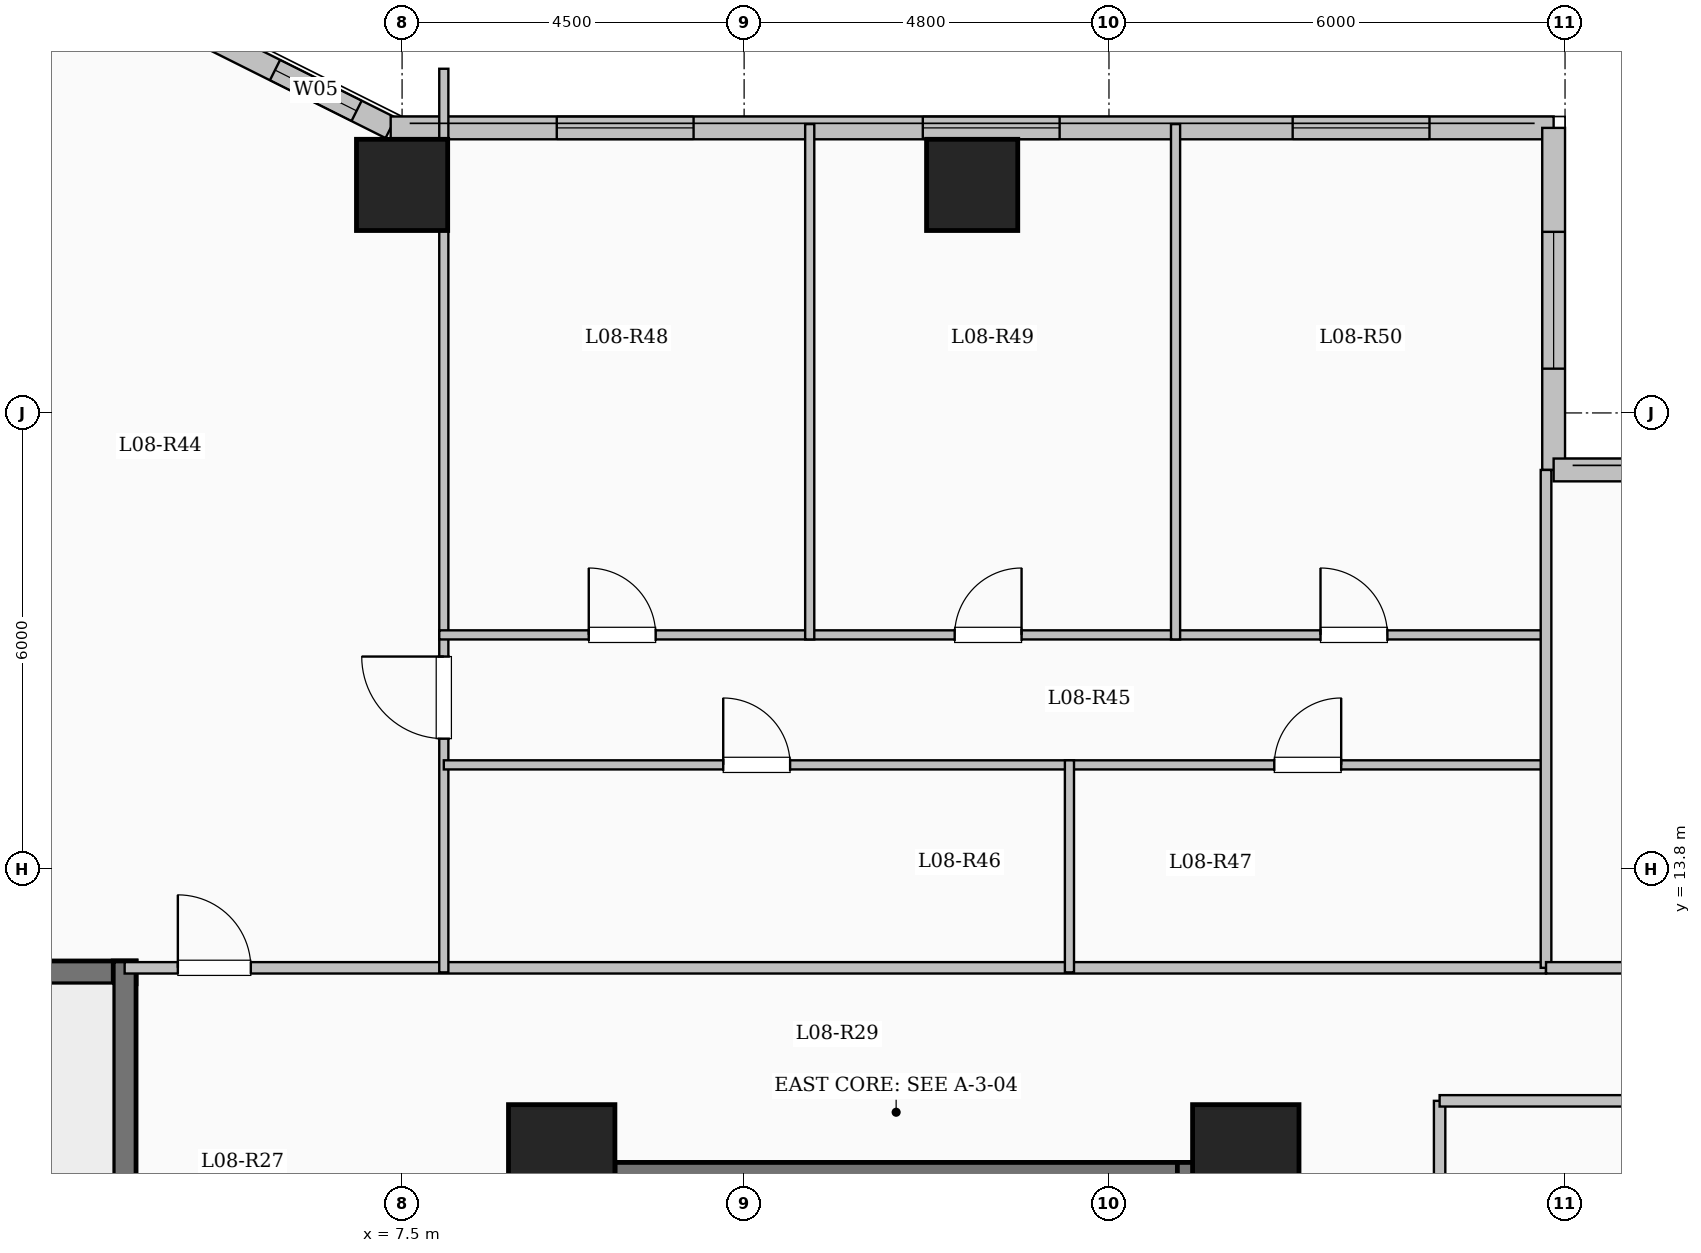
"""IFC4 building model, lengths in metres.
Left out: names, types, materials, properties, quantities, classifications, styles, units other than length and angle.
Written with IfcOpenShell. Run it as: python <this file> out.ifc"""

import sys

from ifc_helpers import new_model, si_unit, direction, frame, frame_2d, origin, origin_2d, place, context, subcontext, project, spatial, rectangle, extrude, element, fill, save


model = new_model("IFC4")
c1 = context("Model", 3, precision=1e-05, world=origin(), true_north=direction((0.0, 1.0)))
c2 = subcontext(c1, "Body", "Model", "MODEL_VIEW")
j1 = project(units=[si_unit("LENGTHUNIT", "METRE"), si_unit("PLANEANGLEUNIT", "RADIAN")], contexts=[c1])
p1 = place(None, origin())
s1 = spatial("IfcSite", under=j1, at=p1, CompositionType="ELEMENT")
p2 = place(p1, origin())
s2 = spatial("IfcBuilding", under=s1, at=p2, CompositionType="ELEMENT")
p3 = place(p2, frame((0.0, 0.0, 34.05)))
s3 = spatial("IfcBuildingStorey", under=s2, at=p3, CompositionType="ELEMENT", Elevation=34.05)
for number, where, z_axis, x_axis in (
    (1, (9.6, 10.0, 0.0), (0.0, 0.0, 1.0), (1.0, 0.0, 0.0)),
    (2, (18.6, 10.0, 0.0), (0.0, 0.0, 1.0), (1.0, 0.0, 0.0)),
):
    element("IfcColumn", number, at=place(p3, frame(where, z_axis=z_axis, x_axis=x_axis)), inside=s3, PredefinedType="COLUMN", context=c2, shape_type="SweptSolid", body=[
        extrude(rectangle(XDim=1.4, YDim=1.4, at=origin_2d()), origin(), (0.0, 0.0, 1.0), 3.35),
    ])
for number, where, z_axis, x_axis in (
    (3, (7.5, 22.8, 0.0), (0.0, 0.0, 1.0), (1.0, 0.0, 0.0)),
    (4, (15.0, 22.8, 0.0), (0.0, 0.0, 1.0), (1.0, 0.0, 0.0)),
):
    element("IfcColumn", number, at=place(p3, frame(where, z_axis=z_axis, x_axis=x_axis)), inside=s3, PredefinedType="COLUMN", context=c2, shape_type="SweptSolid", body=[
        extrude(rectangle(XDim=1.2, YDim=1.2, at=origin_2d()), origin(), (0.0, 0.0, 1.0), 3.35),
    ])
p4 = place(p3, frame((4.35, 25.05, 0.0), z_axis=(0.0, 0.0, 1.0), x_axis=(0.894427191, -0.4472135955, 0.0)))
e5 = element("IfcWall", 5, at=p4, inside=s3, PredefinedType="SOLIDWALL", context=c2, shape_type="SweptSolid", body=[
    extrude(rectangle(XDim=3.354, YDim=0.3, at=frame_2d((1.677, 0.0))), origin(), (0.0, 0.0, 1.0), 3.1),
])
p5 = place(p4, frame((1.653, 0.0, 0.95)))
e6 = element("IfcOpeningElement", 6, at=p5, cuts=e5, PredefinedType="OPENING", context=c2, shape_type="SweptSolid", body=[
    extrude(rectangle(XDim=1.2, YDim=1.5, at=frame_2d((0.6, 0.75))), frame((0.0, 0.16, 0.0), z_axis=(0.0, -1.0, 0.0), x_axis=(1.0, 0.0, 0.0)), (0.0, 0.0, 1.0), 0.32),
])
p6 = place(p3, frame((7.35, 23.55, 0.0), z_axis=(0.0, 0.0, 1.0), x_axis=(1.0, 0.0, 0.0)))
e7 = element("IfcWall", 7, at=p6, inside=s3, PredefinedType="SOLIDWALL", context=c2, shape_type="SweptSolid", body=[
    extrude(rectangle(XDim=15.3, YDim=0.3, at=frame_2d((7.65, 0.0))), origin(), (0.0, 0.0, 1.0), 3.1),
])
p7 = place(p6, frame((2.185, 0.0, 0.9)))
e8 = element("IfcOpeningElement", 8, at=p7, cuts=e7, PredefinedType="OPENING", context=c2, shape_type="SweptSolid", body=[
    extrude(rectangle(XDim=1.8, YDim=1.65, at=frame_2d((0.9, 0.825))), frame((0.0, 0.16, 0.0), z_axis=(0.0, -1.0, 0.0), x_axis=(1.0, 0.0, 0.0)), (0.0, 0.0, 1.0), 0.32),
])
p8 = place(p6, frame((7.001, 0.0, 0.9)))
e9 = element("IfcOpeningElement", 9, at=p8, cuts=e7, PredefinedType="OPENING", context=c2, shape_type="SweptSolid", body=[
    extrude(rectangle(XDim=1.8, YDim=1.65, at=frame_2d((0.9, 0.825))), frame((0.0, 0.16, 0.0), z_axis=(0.0, -1.0, 0.0), x_axis=(1.0, 0.0, 0.0)), (0.0, 0.0, 1.0), 0.32),
])
p9 = place(p6, frame((11.867, 0.0, 0.9)))
e10 = element("IfcOpeningElement", 10, at=p9, cuts=e7, PredefinedType="OPENING", context=c2, shape_type="SweptSolid", body=[
    extrude(rectangle(XDim=1.8, YDim=1.65, at=frame_2d((0.9, 0.825))), frame((0.0, 0.16, 0.0), z_axis=(0.0, -1.0, 0.0), x_axis=(1.0, 0.0, 0.0)), (0.0, 0.0, 1.0), 0.32),
])
p10 = place(p3, frame((22.65, 23.55, 0.0), z_axis=(0.0, 0.0, 1.0), x_axis=(0.0, -1.0, 0.0)))
e11 = element("IfcWall", 11, at=p10, inside=s3, PredefinedType="SOLIDWALL", context=c2, shape_type="SweptSolid", body=[
    extrude(rectangle(XDim=4.5, YDim=0.3, at=frame_2d((2.25, 0.0))), origin(), (0.0, 0.0, 1.0), 3.1),
])
p11 = place(p10, frame((1.367, 0.0, 0.9)))
e12 = element("IfcOpeningElement", 12, at=p11, cuts=e11, PredefinedType="OPENING", context=c2, shape_type="SweptSolid", body=[
    extrude(rectangle(XDim=1.8, YDim=1.65, at=frame_2d((0.9, 0.825))), frame((0.0, 0.16, 0.0), z_axis=(0.0, -1.0, 0.0), x_axis=(1.0, 0.0, 0.0)), (0.0, 0.0, 1.0), 0.32),
])
p12 = place(p3, frame((22.65, 19.05, 0.0), z_axis=(0.0, 0.0, 1.0), x_axis=(1.0, 0.0, 0.0)))
e13 = element("IfcWall", 13, at=p12, inside=s3, PredefinedType="SOLIDWALL", context=c2, shape_type="SweptSolid", body=[
    extrude(rectangle(XDim=6.0, YDim=0.3, at=frame_2d((3.0, 0.0))), origin(), (0.0, 0.0, 1.0), 3.1),
])
p13 = place(p12, frame((1.975, 0.0, 0.9)))
e14 = element("IfcOpeningElement", 14, at=p13, cuts=e13, PredefinedType="OPENING", context=c2, shape_type="SweptSolid", body=[
    extrude(rectangle(XDim=2.0, YDim=1.7, at=frame_2d((1.0, 0.85))), frame((0.0, 0.16, 0.0), z_axis=(0.0, -1.0, 0.0), x_axis=(1.0, 0.0, 0.0)), (0.0, 0.0, 1.0), 0.32),
])
p14 = place(p3, frame((10.0, 9.79, 0.0), z_axis=(0.0, 0.0, 1.0), x_axis=(1.0, 0.0, 0.0)))
e15 = element("IfcWall", 15, at=p14, inside=s3, PredefinedType="SHEAR", context=c2, shape_type="SweptSolid", body=[
    extrude(rectangle(XDim=8.0, YDim=0.3, at=frame_2d((4.0, 0.0))), origin(), (0.0, 0.0, 1.0), 3.35),
])
for number, where, z_axis, x_axis in (
    (16, (10.15, 6.35, 0.0), (0.0, 0.0, 1.0), (0.0, 1.0, 0.0)),
    (17, (17.85, 6.35, 0.0), (0.0, 0.0, 1.0), (0.0, 1.0, 0.0)),
):
    element("IfcWall", number, at=place(p3, frame(where, z_axis=z_axis, x_axis=x_axis)), inside=s3, PredefinedType="SHEAR", context=c2, shape_type="SweptSolid", body=[
        extrude(rectangle(XDim=3.59, YDim=0.3, at=frame_2d((1.795, 0.0))), origin(), (0.0, 0.0, 1.0), 3.35),
    ])
p15 = place(p3, frame((-4.0, 12.44, 0.0), z_axis=(0.0, 0.0, 1.0), x_axis=(1.0, 0.0, 0.0)))
e18 = element("IfcWall", 18, at=p15, inside=s3, PredefinedType="SHEAR", context=c2, shape_type="SweptSolid", body=[
    extrude(rectangle(XDim=8.0, YDim=0.3, at=frame_2d((4.0, 0.0))), origin(), (0.0, 0.0, 1.0), 3.35),
])
p16 = place(p3, frame((3.85, 9.0, 0.0), z_axis=(0.0, 0.0, 1.0), x_axis=(0.0, 1.0, 0.0)))
e19 = element("IfcWall", 19, at=p16, inside=s3, PredefinedType="SHEAR", context=c2, shape_type="SweptSolid", body=[
    extrude(rectangle(XDim=3.59, YDim=0.3, at=frame_2d((1.795, 0.0))), origin(), (0.0, 0.0, 1.0), 3.35),
])
p17 = place(p3, frame((3.85, 12.5, 0.0), z_axis=(0.0, 0.0, 1.0), x_axis=(1.0, 0.0, 0.0)))
e20 = element("IfcWall", 20, at=p17, inside=s3, PredefinedType="PARTITIONING", context=c2, shape_type="SweptSolid", body=[
    extrude(rectangle(XDim=18.7, YDim=0.15, at=frame_2d((9.35, 0.0))), origin(), (0.0, 0.0, 1.0), 3.1),
])
p18 = place(p17, frame((0.7, 0.0, 0.0)))
e21 = element("IfcOpeningElement", 21, at=p18, cuts=e20, PredefinedType="OPENING", context=c2, shape_type="SweptSolid", body=[
    extrude(rectangle(XDim=0.96, YDim=2.15, at=frame_2d((0.48, 1.075))), frame((0.0, 0.085, 0.0), z_axis=(0.0, -1.0, 0.0), x_axis=(1.0, 0.0, 0.0)), (0.0, 0.0, 1.0), 0.17),
])
p19 = place(p3, frame((21.15, -7.25, 0.0), z_axis=(0.0, 0.0, 1.0), x_axis=(0.0, 1.0, 0.0)))
e22 = element("IfcWall", 22, at=p19, inside=s3, PredefinedType="PARTITIONING", context=c2, shape_type="SweptSolid", body=[
    extrude(rectangle(XDim=18.0, YDim=0.15, at=frame_2d((9.0, 0.0))), origin(), (0.0, 0.0, 1.0), 2.585),
])
p20 = place(p3, frame((8.049, 12.44, 0.0), z_axis=(0.0, 0.0, 1.0), x_axis=(0.0, 1.0, 0.0)))
e23 = element("IfcWall", 23, at=p20, inside=s3, PredefinedType="PARTITIONING", context=c2, shape_type="SweptSolid", body=[
    extrude(rectangle(XDim=11.888, YDim=0.12, at=frame_2d((5.944, 0.0))), origin(), (0.0, 0.0, 1.0), 2.435),
])
p21 = place(p20, frame((3.075, 0.0, 0.0)))
e24 = element("IfcOpeningElement", 24, at=p21, cuts=e23, PredefinedType="OPENING", context=c2, shape_type="SweptSolid", body=[
    extrude(rectangle(XDim=1.08, YDim=2.15, at=frame_2d((0.54, 1.075))), frame((0.0, 0.07, 0.0), z_axis=(0.0, -1.0, 0.0), x_axis=(1.0, 0.0, 0.0)), (0.0, 0.0, 1.0), 0.14),
])
p22 = place(p3, frame((8.049, 15.17, 0.0), z_axis=(0.0, 0.0, 1.0), x_axis=(1.0, 0.0, 0.0)))
e25 = element("IfcWall", 25, at=p22, inside=s3, PredefinedType="PARTITIONING", context=c2, shape_type="SweptSolid", body=[
    extrude(rectangle(XDim=8.231, YDim=0.12, at=frame_2d((4.115, 0.0))), origin(), (0.0, 0.0, 1.0), 3.1),
])
p23 = place(p22, frame((3.676, 0.0, 0.0)))
e26 = element("IfcOpeningElement", 26, at=p23, cuts=e25, PredefinedType="OPENING", context=c2, shape_type="SweptSolid", body=[
    extrude(rectangle(XDim=0.88, YDim=2.1, at=frame_2d((0.44, 1.05))), frame((0.0, 0.07, 0.0), z_axis=(0.0, -1.0, 0.0), x_axis=(1.0, 0.0, 0.0)), (0.0, 0.0, 1.0), 0.14),
])
p24 = place(p3, frame((16.28, 15.17, 0.0), z_axis=(0.0, 0.0, 1.0), x_axis=(1.0, 0.0, 0.0)))
e27 = element("IfcWall", 27, at=p24, inside=s3, PredefinedType="PARTITIONING", context=c2, shape_type="SweptSolid", body=[
    extrude(rectangle(XDim=6.27, YDim=0.12, at=frame_2d((3.135, 0.0))), origin(), (0.0, 0.0, 1.0), 3.1),
])
p25 = place(p24, frame((2.695, 0.0, 0.0)))
e28 = element("IfcOpeningElement", 28, at=p25, cuts=e27, PredefinedType="OPENING", context=c2, shape_type="SweptSolid", body=[
    extrude(rectangle(XDim=0.88, YDim=2.1, at=frame_2d((0.44, 1.05))), frame((0.0, 0.07, 0.0), z_axis=(0.0, -1.0, 0.0), x_axis=(1.0, 0.0, 0.0)), (0.0, 0.0, 1.0), 0.14),
])
p26 = place(p3, frame((7.989, 16.88, 0.0), z_axis=(0.0, 0.0, 1.0), x_axis=(1.0, 0.0, 0.0)))
e29 = element("IfcWall", 29, at=p26, inside=s3, PredefinedType="PARTITIONING", context=c2, shape_type="SweptSolid", body=[
    extrude(rectangle(XDim=14.621, YDim=0.12, at=frame_2d((7.311, 0.0))), origin(), (0.0, 0.0, 1.0), 3.1),
])
p27 = place(p26, frame((1.967, 0.0, 0.0)))
e30 = element("IfcOpeningElement", 30, at=p27, cuts=e29, PredefinedType="OPENING", context=c2, shape_type="SweptSolid", body=[
    extrude(rectangle(XDim=0.88, YDim=2.1, at=frame_2d((0.44, 1.05))), frame((0.0, 0.07, 0.0), z_axis=(0.0, -1.0, 0.0), x_axis=(1.0, 0.0, 0.0)), (0.0, 0.0, 1.0), 0.14),
])
p28 = place(p26, frame((6.781, 0.0, 0.0)))
e31 = element("IfcOpeningElement", 31, at=p28, cuts=e29, PredefinedType="OPENING", context=c2, shape_type="SweptSolid", body=[
    extrude(rectangle(XDim=0.88, YDim=2.1, at=frame_2d((0.44, 1.05))), frame((0.0, 0.07, 0.0), z_axis=(0.0, -1.0, 0.0), x_axis=(1.0, 0.0, 0.0)), (0.0, 0.0, 1.0), 0.14),
])
p29 = place(p26, frame((11.594, 0.0, 0.0)))
e32 = element("IfcOpeningElement", 32, at=p29, cuts=e29, PredefinedType="OPENING", context=c2, shape_type="SweptSolid", body=[
    extrude(rectangle(XDim=0.88, YDim=2.1, at=frame_2d((0.44, 1.05))), frame((0.0, 0.07, 0.0), z_axis=(0.0, -1.0, 0.0), x_axis=(1.0, 0.0, 0.0)), (0.0, 0.0, 1.0), 0.14),
])
p30 = place(p3, frame((16.28, 12.44, 0.0), z_axis=(0.0, 0.0, 1.0), x_axis=(0.0, 1.0, 0.0)))
e33 = element("IfcWall", 33, at=p30, inside=s3, PredefinedType="PARTITIONING", context=c2, shape_type="SweptSolid", body=[
    extrude(rectangle(XDim=2.79, YDim=0.12, at=frame_2d((1.395, 0.0))), origin(), (0.0, 0.0, 1.0), 3.1),
])
for number, where, z_axis, x_axis in (
    (34, (12.863, 16.82, 0.0), (0.0, 0.0, 1.0), (0.0, 1.0, 0.0)),
    (35, (17.676, 16.82, 0.0), (0.0, 0.0, 1.0), (0.0, 1.0, 0.0)),
):
    element("IfcWall", number, at=place(p3, frame(where, z_axis=z_axis, x_axis=x_axis)), inside=s3, PredefinedType="PARTITIONING", context=c2, shape_type="SweptSolid", body=[
        extrude(rectangle(XDim=6.78, YDim=0.12, at=frame_2d((3.39, 0.0))), origin(), (0.0, 0.0, 1.0), 3.1),
    ])
p31 = place(p3, frame((21.15, 10.75, 0.0), z_axis=(0.0, 0.0, 1.0), x_axis=(1.0, 0.0, 0.0)))
e36 = element("IfcWall", 36, at=p31, inside=s3, PredefinedType="PARTITIONING", context=c2, shape_type="SweptSolid", body=[
    extrude(rectangle(XDim=7.53, YDim=0.15, at=frame_2d((3.765, 0.0))), origin(), (0.0, 0.0, 1.0), 3.1),
])
p32 = place(p3, frame((22.55, 12.5, 0.0), z_axis=(0.0, 0.0, 1.0), x_axis=(0.0, 1.0, 0.0)))
e37 = element("IfcWall", 37, at=p32, inside=s3, PredefinedType="PARTITIONING", context=c2, shape_type="SweptSolid", body=[
    extrude(rectangle(XDim=6.55, YDim=0.14, at=frame_2d((3.275, 0.0))), origin(), (0.0, 0.0, 1.0), 3.1),
])
p33 = place(p3, frame((22.55, 12.5, 0.0), z_axis=(0.0, 0.0, 1.0), x_axis=(1.0, 0.0, 0.0)))
e38 = element("IfcWall", 38, at=p33, inside=s3, PredefinedType="PARTITIONING", context=c2, shape_type="SweptSolid", body=[
    extrude(rectangle(XDim=6.13, YDim=0.15, at=frame_2d((3.065, 0.0))), origin(), (0.0, 0.0, 1.0), 3.1),
])
p34 = place(p33, frame((2.59, 0.0, 0.0)))
e39 = element("IfcOpeningElement", 39, at=p34, cuts=e38, PredefinedType="OPENING", context=c2, shape_type="SweptSolid", body=[
    extrude(rectangle(XDim=0.95, YDim=2.15, at=frame_2d((0.475, 1.075))), frame((0.0, 0.085, 0.0), z_axis=(0.0, -1.0, 0.0), x_axis=(1.0, 0.0, 0.0)), (0.0, 0.0, 1.0), 0.17),
])
p35 = place(p5, origin())
e40 = element("IfcWindow", 40, at=p35, inside=s3, PartitioningType="SINGLE_PANEL", PredefinedType="WINDOW", context=c2, shape_type="SweptSolid", body=[
    extrude(rectangle(XDim=1.2, YDim=1.5, at=frame_2d((0.6, 0.75))), frame((0.0, 0.03, 0.0), z_axis=(0.0, -1.0, 0.0), x_axis=(1.0, 0.0, 0.0)), (0.0, 0.0, 1.0), 0.06),
])
fill(e6, e40)
p36 = place(p7, origin())
e41 = element("IfcWindow", 41, at=p36, inside=s3, PartitioningType="SINGLE_PANEL", PredefinedType="WINDOW", context=c2, shape_type="SweptSolid", body=[
    extrude(rectangle(XDim=1.8, YDim=1.65, at=frame_2d((0.9, 0.825))), frame((0.0, 0.03, 0.0), z_axis=(0.0, -1.0, 0.0), x_axis=(1.0, 0.0, 0.0)), (0.0, 0.0, 1.0), 0.06),
])
fill(e8, e41)
p37 = place(p8, origin())
e42 = element("IfcWindow", 42, at=p37, inside=s3, PartitioningType="SINGLE_PANEL", PredefinedType="WINDOW", context=c2, shape_type="SweptSolid", body=[
    extrude(rectangle(XDim=1.8, YDim=1.65, at=frame_2d((0.9, 0.825))), frame((0.0, 0.03, 0.0), z_axis=(0.0, -1.0, 0.0), x_axis=(1.0, 0.0, 0.0)), (0.0, 0.0, 1.0), 0.06),
])
fill(e9, e42)
p38 = place(p9, origin())
e43 = element("IfcWindow", 43, at=p38, inside=s3, PartitioningType="SINGLE_PANEL", PredefinedType="WINDOW", context=c2, shape_type="SweptSolid", body=[
    extrude(rectangle(XDim=1.8, YDim=1.65, at=frame_2d((0.9, 0.825))), frame((0.0, 0.03, 0.0), z_axis=(0.0, -1.0, 0.0), x_axis=(1.0, 0.0, 0.0)), (0.0, 0.0, 1.0), 0.06),
])
fill(e10, e43)
p39 = place(p11, origin())
e44 = element("IfcWindow", 44, at=p39, inside=s3, PartitioningType="SINGLE_PANEL", PredefinedType="WINDOW", context=c2, shape_type="SweptSolid", body=[
    extrude(rectangle(XDim=1.8, YDim=1.65, at=frame_2d((0.9, 0.825))), frame((0.0, 0.03, 0.0), z_axis=(0.0, -1.0, 0.0), x_axis=(1.0, 0.0, 0.0)), (0.0, 0.0, 1.0), 0.06),
])
fill(e12, e44)
p40 = place(p18, origin())
e45 = element("IfcDoor", 45, at=p40, inside=s3, OperationType="SINGLE_SWING_LEFT", PredefinedType="DOOR", context=c2, shape_type="SweptSolid", body=[
    extrude(rectangle(XDim=0.96, YDim=2.15, at=frame_2d((0.48, 1.075))), frame((0.0, 0.025, 0.0), z_axis=(0.0, -1.0, 0.0), x_axis=(1.0, 0.0, 0.0)), (0.0, 0.0, 1.0), 0.05),
])
fill(e21, e45)
p41 = place(p21, origin())
e46 = element("IfcDoor", 46, at=p41, inside=s3, OperationType="SINGLE_SWING_RIGHT", PredefinedType="DOOR", context=c2, shape_type="SweptSolid", body=[
    extrude(rectangle(XDim=1.08, YDim=2.15, at=frame_2d((0.54, 1.075))), frame((0.0, 0.025, 0.0), z_axis=(0.0, -1.0, 0.0), x_axis=(1.0, 0.0, 0.0)), (0.0, 0.0, 1.0), 0.05),
])
fill(e24, e46)
p42 = place(p23, origin())
e47 = element("IfcDoor", 47, at=p42, inside=s3, OperationType="SINGLE_SWING_LEFT", PredefinedType="DOOR", context=c2, shape_type="SweptSolid", body=[
    extrude(rectangle(XDim=0.88, YDim=2.1, at=frame_2d((0.44, 1.05))), frame((0.0, 0.025, 0.0), z_axis=(0.0, -1.0, 0.0), x_axis=(1.0, 0.0, 0.0)), (0.0, 0.0, 1.0), 0.05),
])
fill(e26, e47)
p43 = place(p25, origin())
e48 = element("IfcDoor", 48, at=p43, inside=s3, OperationType="SINGLE_SWING_RIGHT", PredefinedType="DOOR", context=c2, shape_type="SweptSolid", body=[
    extrude(rectangle(XDim=0.88, YDim=2.1, at=frame_2d((0.44, 1.05))), frame((0.0, 0.025, 0.0), z_axis=(0.0, -1.0, 0.0), x_axis=(1.0, 0.0, 0.0)), (0.0, 0.0, 1.0), 0.05),
])
fill(e28, e48)
p44 = place(p27, origin())
e49 = element("IfcDoor", 49, at=p44, inside=s3, OperationType="SINGLE_SWING_LEFT", PredefinedType="DOOR", context=c2, shape_type="SweptSolid", body=[
    extrude(rectangle(XDim=0.88, YDim=2.1, at=frame_2d((0.44, 1.05))), frame((0.0, 0.025, 0.0), z_axis=(0.0, -1.0, 0.0), x_axis=(1.0, 0.0, 0.0)), (0.0, 0.0, 1.0), 0.05),
])
fill(e30, e49)
p45 = place(p28, origin())
e50 = element("IfcDoor", 50, at=p45, inside=s3, OperationType="SINGLE_SWING_RIGHT", PredefinedType="DOOR", context=c2, shape_type="SweptSolid", body=[
    extrude(rectangle(XDim=0.88, YDim=2.1, at=frame_2d((0.44, 1.05))), frame((0.0, 0.025, 0.0), z_axis=(0.0, -1.0, 0.0), x_axis=(1.0, 0.0, 0.0)), (0.0, 0.0, 1.0), 0.05),
])
fill(e31, e50)
p46 = place(p29, origin())
e51 = element("IfcDoor", 51, at=p46, inside=s3, OperationType="SINGLE_SWING_LEFT", PredefinedType="DOOR", context=c2, shape_type="SweptSolid", body=[
    extrude(rectangle(XDim=0.88, YDim=2.1, at=frame_2d((0.44, 1.05))), frame((0.0, 0.025, 0.0), z_axis=(0.0, -1.0, 0.0), x_axis=(1.0, 0.0, 0.0)), (0.0, 0.0, 1.0), 0.05),
])
fill(e32, e51)
save(model, sys.argv[1])
